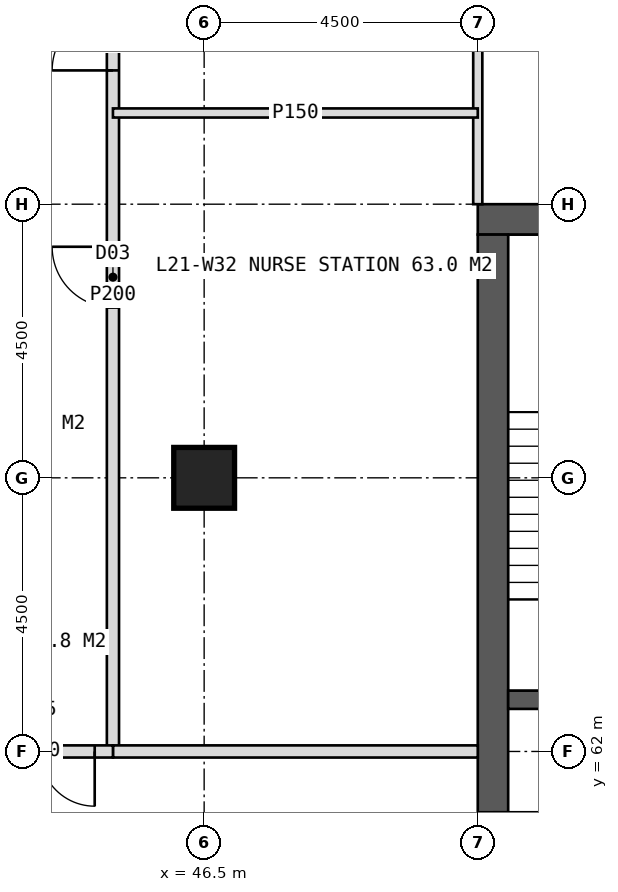
"""IFC4 building model, lengths in metres.
Left out: names, types, materials, properties, quantities, classifications, styles, units other than length and angle.
Written with IfcOpenShell. Run it as: python <this file> out.ifc"""

import sys

from ifc_helpers import new_model, si_unit, direction, frame, frame_2d, origin, origin_2d, place, context, subcontext, project, spatial, rectangle, hollow_rectangle, extrude, element, fill, save


model = new_model("IFC4")
c1 = context("Model", 3, precision=1e-05, world=origin(), true_north=direction((0.0, 1.0)))
c2 = subcontext(c1, "Body", "Model", "MODEL_VIEW")
j1 = project(units=[si_unit("LENGTHUNIT", "METRE"), si_unit("PLANEANGLEUNIT", "RADIAN")], contexts=[c1])
p1 = place(None, origin())
s1 = spatial("IfcSite", under=j1, at=p1, CompositionType="ELEMENT")
p2 = place(p1, origin())
s2 = spatial("IfcBuilding", under=s1, at=p2, CompositionType="ELEMENT")
p3 = place(p2, frame((0.0, 0.0, 91.0)))
s3 = spatial("IfcBuildingStorey", under=s2, at=p3, CompositionType="ELEMENT", Elevation=91.0)
p4 = place(p3, frame((51.0, 70.75, 0.0), z_axis=(0.0, 0.0, 1.0), x_axis=(1.0, 0.0, 0.0)))
e1 = element("IfcWall", 1, at=p4, inside=s3, PredefinedType="SHEAR", context=c2, shape_type="SweptSolid", body=[
    extrude(rectangle(XDim=18.0, YDim=0.5, at=frame_2d((9.0, 0.0))), origin(), (0.0, 0.0, 1.0), 4.0),
])
p5 = place(p4, frame((8.1, 0.0, 0.0)))
e2 = element("IfcOpeningElement", 2, at=p5, cuts=e1, PredefinedType="OPENING", context=c2, shape_type="SweptSolid", body=[
    extrude(rectangle(XDim=1.8, YDim=2.2, at=frame_2d((0.9, 1.1))), frame((0.0, 0.26, 0.0), z_axis=(0.0, -1.0, 0.0), x_axis=(1.0, 0.0, 0.0)), (0.0, 0.0, 1.0), 0.52),
])
p6 = place(p3, frame((51.25, 53.5, 0.0), z_axis=(0.0, 0.0, 1.0), x_axis=(0.0, 1.0, 0.0)))
e3 = element("IfcWall", 3, at=p6, inside=s3, PredefinedType="SHEAR", context=c2, shape_type="SweptSolid", body=[
    extrude(rectangle(XDim=17.0, YDim=0.5, at=frame_2d((8.5, 0.0))), origin(), (0.0, 0.0, 1.0), 4.0),
])
p7 = place(p6, frame((6.0, 0.0, 0.0)))
e4 = element("IfcOpeningElement", 4, at=p7, cuts=e3, PredefinedType="OPENING", context=c2, shape_type="SweptSolid", body=[
    extrude(rectangle(XDim=1.5, YDim=2.2, at=frame_2d((0.75, 1.1))), frame((0.0, 0.26, 0.0), z_axis=(0.0, -1.0, 0.0), x_axis=(1.0, 0.0, 0.0)), (0.0, 0.0, 1.0), 0.52),
])
p8 = place(p3, frame((51.5, 62.85, 0.0), z_axis=(0.0, 0.0, 1.0), x_axis=(1.0, 0.0, 0.0)))
e5 = element("IfcWall", 5, at=p8, inside=s3, PredefinedType="SHEAR", context=c2, shape_type="SweptSolid", body=[
    extrude(rectangle(XDim=3.3, YDim=0.3, at=frame_2d((1.65, 0.0))), origin(), (0.0, 0.0, 1.0), 4.0),
])
p9 = place(p8, frame((1.05, 0.0, 0.0)))
e6 = element("IfcOpeningElement", 6, at=p9, cuts=e5, PredefinedType="OPENING", context=c2, shape_type="SweptSolid", body=[
    extrude(rectangle(XDim=1.2, YDim=2.1, at=frame_2d((0.6, 1.05))), frame((0.0, 0.16, 0.0), z_axis=(0.0, -1.0, 0.0), x_axis=(1.0, 0.0, 0.0)), (0.0, 0.0, 1.0), 0.32),
])
p10 = place(p3, frame((46.5, 66.5, 0.0), z_axis=(0.0, 0.0, 1.0), x_axis=(1.0, 0.0, 0.0)))
e7 = element("IfcColumn", 7, at=p10, inside=s3, PredefinedType="COLUMN", context=c2, shape_type="SweptSolid", body=[
    extrude(hollow_rectangle(XDim=1.0, YDim=1.0, WallThickness=0.1, at=origin_2d()), origin(), (0.0, 0.0, 1.0), 4.0),
])
p11 = place(p3, frame((51.0, 71.0, 0.0), z_axis=(0.0, 0.0, 1.0), x_axis=(0.0, 1.0, 0.0)))
e8 = element("IfcWall", 8, at=p11, inside=s3, PredefinedType="PARTITIONING", context=c2, shape_type="SweptSolid", body=[
    extrude(rectangle(XDim=6.0, YDim=0.15, at=frame_2d((3.0, 0.0))), origin(), (0.0, 0.0, 1.0), 3.75),
])
p12 = place(p3, frame((45.0, 62.0, 0.0), z_axis=(0.0, 0.0, 1.0), x_axis=(0.0, 1.0, 0.0)))
e9 = element("IfcWall", 9, at=p12, inside=s3, PredefinedType="PARTITIONING", context=c2, shape_type="SweptSolid", body=[
    extrude(rectangle(XDim=15.0, YDim=0.2, at=frame_2d((7.5, 0.0))), origin(), (0.0, 0.0, 1.0), 3.75),
])
p13 = place(p12, frame((7.3, 0.0, 0.0)))
e10 = element("IfcOpeningElement", 10, at=p13, cuts=e9, PredefinedType="OPENING", context=c2, shape_type="SweptSolid", body=[
    extrude(rectangle(XDim=1.0, YDim=2.1, at=frame_2d((0.5, 1.05))), frame((0.0, 0.11, 0.0), z_axis=(0.0, -1.0, 0.0), x_axis=(1.0, 0.0, 0.0)), (0.0, 0.0, 1.0), 0.22),
])
p14 = place(p12, frame((11.2, 0.0, 0.0)))
e11 = element("IfcOpeningElement", 11, at=p14, cuts=e9, PredefinedType="OPENING", context=c2, shape_type="SweptSolid", body=[
    extrude(rectangle(XDim=1.0, YDim=2.1, at=frame_2d((0.5, 1.05))), frame((0.0, 0.11, 0.0), z_axis=(0.0, -1.0, 0.0), x_axis=(1.0, 0.0, 0.0)), (0.0, 0.0, 1.0), 0.22),
])
p15 = place(p3, frame((51.0, 62.0, 0.0), z_axis=(0.0, 0.0, 1.0), x_axis=(-1.0, 0.0, 0.0)))
e12 = element("IfcWall", 12, at=p15, inside=s3, PredefinedType="SOLIDWALL", context=c2, shape_type="SweptSolid", body=[
    extrude(rectangle(XDim=6.0, YDim=0.2, at=frame_2d((3.0, 0.0))), origin(), (0.0, 0.0, 1.0), 2.75),
])
p16 = place(p3, frame((51.0, 72.5, 0.0), z_axis=(0.0, 0.0, 1.0), x_axis=(-1.0, 0.0, 0.0)))
e13 = element("IfcWall", 13, at=p16, inside=s3, PredefinedType="PARTITIONING", context=c2, shape_type="SweptSolid", body=[
    extrude(rectangle(XDim=6.0, YDim=0.15, at=frame_2d((3.0, 0.0))), origin(), (0.0, 0.0, 1.0), 3.75),
])
p17 = place(p3, frame((45.0, 62.0, 0.0), z_axis=(0.0, 0.0, 1.0), x_axis=(-1.0, 0.0, 0.0)))
e14 = element("IfcWall", 14, at=p17, inside=s3, PredefinedType="SOLIDWALL", context=c2, shape_type="SweptSolid", body=[
    extrude(rectangle(XDim=2.7, YDim=0.2, at=frame_2d((1.35, 0.0))), origin(), (0.0, 0.0, 1.0), 2.75),
])
p18 = place(p17, frame((0.3, 0.0, 0.0)))
e15 = element("IfcOpeningElement", 15, at=p18, cuts=e14, PredefinedType="OPENING", context=c2, shape_type="SweptSolid", body=[
    extrude(rectangle(XDim=1.8, YDim=2.2, at=frame_2d((0.9, 1.1))), frame((0.0, 0.11, 0.0), z_axis=(0.0, -1.0, 0.0), x_axis=(1.0, 0.0, 0.0)), (0.0, 0.0, 1.0), 0.22),
])
p19 = place(p13, origin())
e16 = element("IfcDoor", 16, at=p19, inside=s3, OperationType="SINGLE_SWING_RIGHT", PredefinedType="DOOR", context=c2, shape_type="SweptSolid", body=[
    extrude(rectangle(XDim=1.0, YDim=2.1, at=frame_2d((0.5, 1.05))), frame((0.0, 0.025, 0.0), z_axis=(0.0, -1.0, 0.0), x_axis=(1.0, 0.0, 0.0)), (0.0, 0.0, 1.0), 0.05),
])
fill(e10, e16)
p20 = place(p14, origin())
e17 = element("IfcDoor", 17, at=p20, inside=s3, OperationType="SINGLE_SWING_LEFT", PredefinedType="DOOR", context=c2, shape_type="SweptSolid", body=[
    extrude(rectangle(XDim=1.0, YDim=2.1, at=frame_2d((0.5, 1.05))), frame((0.0, 0.025, 0.0), z_axis=(0.0, -1.0, 0.0), x_axis=(1.0, 0.0, 0.0)), (0.0, 0.0, 1.0), 0.05),
])
fill(e11, e17)
p21 = place(p18, origin())
e18 = element("IfcDoor", 18, at=p21, inside=s3, OperationType="DOUBLE_DOOR_DOUBLE_SWING", PredefinedType="DOOR", context=c2, shape_type="SweptSolid", body=[
    extrude(rectangle(XDim=1.8, YDim=2.2, at=frame_2d((0.9, 1.1))), frame((0.0, 0.025, 0.0), z_axis=(0.0, -1.0, 0.0), x_axis=(1.0, 0.0, 0.0)), (0.0, 0.0, 1.0), 0.05),
])
fill(e15, e18)
save(model, sys.argv[1])
